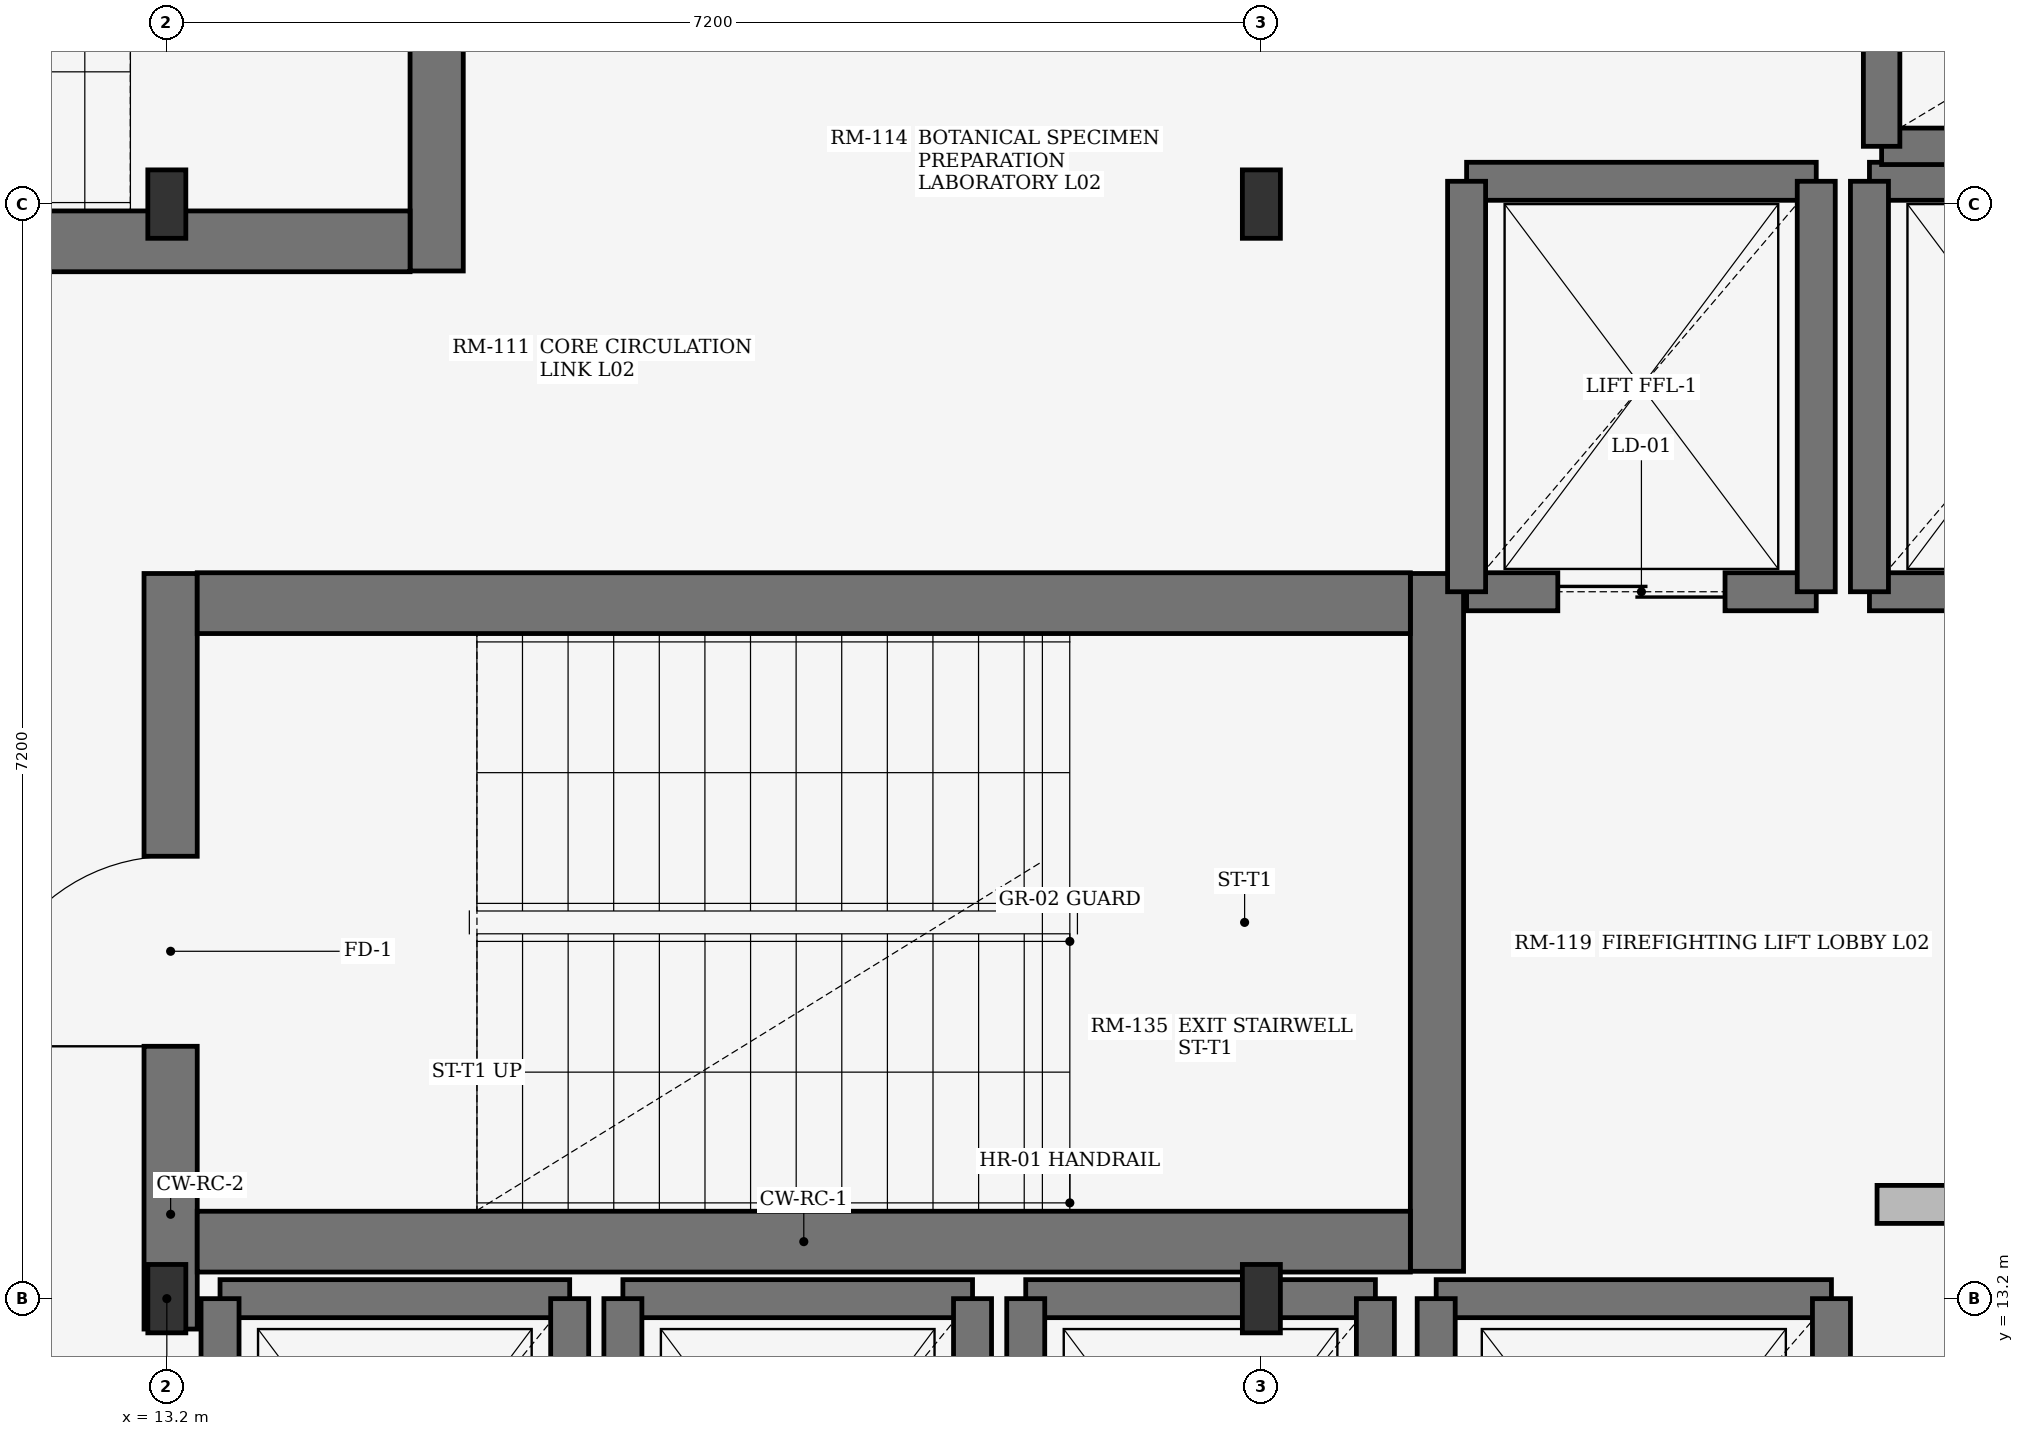
"""IFC4 building model, lengths in metres.
Left out: names, types, materials, properties, quantities, classifications, styles, units other than length and angle.
Written with IfcOpenShell. Run it as: python <this file> out.ifc"""

import sys

from ifc_helpers import new_model, si_unit, direction, frame, frame_2d, origin, origin_2d, place, context, subcontext, project, spatial, rectangle, i_section, extrude, element, fill, save


model = new_model("IFC4")
c1 = context("Model", 3, precision=1e-05, world=origin(), true_north=direction((0.0, 1.0)))
c2 = subcontext(c1, "Body", "Model", "MODEL_VIEW")
j1 = project(units=[si_unit("LENGTHUNIT", "METRE"), si_unit("PLANEANGLEUNIT", "RADIAN")], contexts=[c1])
p1 = place(None, origin())
s1 = spatial("IfcSite", under=j1, at=p1, CompositionType="ELEMENT")
p2 = place(p1, origin())
s2 = spatial("IfcBuilding", under=s1, at=p2, CompositionType="ELEMENT")
p3 = place(p2, frame((0.0, 0.0, 9.0)))
s3 = spatial("IfcBuildingStorey", under=s2, at=p3, CompositionType="ELEMENT", Elevation=9.0)
for number, where, z_axis, x_axis in (
    (1, (13.2, 13.2, 0.0), (0.0, 0.0, 1.0), (1.0, 0.0, 0.0)),
    (2, (13.2, 20.4, 0.0), (0.0, 0.0, 1.0), (1.0, 0.0, 0.0)),
    (3, (20.4, 13.2, 0.0), (0.0, 0.0, 1.0), (1.0, 0.0, 0.0)),
    (4, (20.4, 20.4, 0.0), (0.0, 0.0, 1.0), (1.0, 0.0, 0.0)),
):
    element("IfcColumn", number, at=place(p3, frame(where, z_axis=z_axis, x_axis=x_axis)), inside=s3, PredefinedType="COLUMN", context=c2, shape_type="SweptSolid", body=[
        extrude(i_section(OverallWidth=0.25, OverallDepth=0.45, WebThickness=0.011, FlangeThickness=0.014, at=origin_2d()), origin(), (0.0, 0.0, 1.0), 3.96),
    ])
p4 = place(p3, frame((13.225, 13.0, 0.0), z_axis=(0.0, 0.0, 1.0), x_axis=(0.0, 1.0, 0.0)))
e5 = element("IfcWall", 5, at=p4, inside=s3, PredefinedType="SHEAR", context=c2, shape_type="SweptSolid", body=[
    extrude(rectangle(XDim=4.97, YDim=0.35, at=frame_2d((2.485, 0.0))), origin(), (0.0, 0.0, 1.0), 3.96),
])
p5 = place(p4, frame((1.86, 0.0, 0.0)))
e6 = element("IfcOpeningElement", 6, at=p5, cuts=e5, PredefinedType="OPENING", context=c2, shape_type="SweptSolid", body=[
    extrude(rectangle(XDim=1.25, YDim=2.2, at=frame_2d((0.625, 1.1))), frame((0.0, 0.185, 0.0), z_axis=(0.0, -1.0, 0.0), x_axis=(1.0, 0.0, 0.0)), (0.0, 0.0, 1.0), 0.37),
])
p6 = place(p3, frame((21.555, 13.38, 0.0), z_axis=(0.0, 0.0, 1.0), x_axis=(0.0, 1.0, 0.0)))
e7 = element("IfcWall", 7, at=p6, inside=s3, PredefinedType="SHEAR", context=c2, shape_type="SweptSolid", body=[
    extrude(rectangle(XDim=4.59, YDim=0.35, at=frame_2d((2.295, 0.0))), origin(), (0.0, 0.0, 1.0), 3.96),
])
for number, where, z_axis, x_axis in (
    (8, (13.4, 13.575, 0.0), (0.0, 0.0, 1.0), (1.0, 0.0, 0.0)),
    (9, (13.4, 17.775, 0.0), (0.0, 0.0, 1.0), (1.0, 0.0, 0.0)),
):
    element("IfcWall", number, at=place(p3, frame(where, z_axis=z_axis, x_axis=x_axis)), inside=s3, PredefinedType="SHEAR", context=c2, shape_type="SweptSolid", body=[
        extrude(rectangle(XDim=7.98, YDim=0.4, at=frame_2d((3.99, 0.0))), origin(), (0.0, 0.0, 1.0), 3.96),
    ])
p7 = place(p3, frame((14.975, 24.55, 0.0), z_axis=(0.0, 0.0, 1.0), x_axis=(0.0, -1.0, 0.0)))
e10 = element("IfcWall", 10, at=p7, inside=s3, PredefinedType="SHEAR", context=c2, shape_type="SweptSolid", body=[
    extrude(rectangle(XDim=4.59, YDim=0.35, at=frame_2d((2.295, 0.0))), origin(), (0.0, 0.0, 1.0), 3.96),
])
p8 = place(p7, frame((1.72, 0.0, 0.0)))
e11 = element("IfcOpeningElement", 11, at=p8, cuts=e10, PredefinedType="OPENING", context=c2, shape_type="SweptSolid", body=[
    extrude(rectangle(XDim=1.15, YDim=2.2, at=frame_2d((0.575, 1.1))), frame((0.0, 0.185, 0.0), z_axis=(0.0, -1.0, 0.0), x_axis=(1.0, 0.0, 0.0)), (0.0, 0.0, 1.0), 0.37),
])
p9 = place(p3, frame((14.8, 20.155, 0.0), z_axis=(0.0, 0.0, 1.0), x_axis=(-1.0, 0.0, 0.0)))
e12 = element("IfcWall", 12, at=p9, inside=s3, PredefinedType="SHEAR", context=c2, shape_type="SweptSolid", body=[
    extrude(rectangle(XDim=7.98, YDim=0.4, at=frame_2d((3.99, 0.0))), origin(), (0.0, 0.0, 1.0), 3.96),
])
p10 = place(p3, frame((21.75, 17.85, 0.0), z_axis=(0.0, 0.0, 1.0), x_axis=(1.0, 0.0, 0.0)))
e13 = element("IfcWall", 13, at=p10, inside=s3, PredefinedType="SHEAR", context=c2, shape_type="SweptSolid", body=[
    extrude(rectangle(XDim=2.3, YDim=0.25, at=frame_2d((1.15, 0.0))), origin(), (0.0, 0.0, 1.0), 3.96),
])
p11 = place(p10, frame((0.6, 0.0, 0.0)))
e14 = element("IfcOpeningElement", 14, at=p11, cuts=e13, PredefinedType="OPENING", context=c2, shape_type="SweptSolid", body=[
    extrude(rectangle(XDim=1.1, YDim=2.2, at=frame_2d((0.55, 1.1))), frame((0.0, 0.135, 0.0), z_axis=(0.0, -1.0, 0.0), x_axis=(1.0, 0.0, 0.0)), (0.0, 0.0, 1.0), 0.27),
])
p12 = place(p3, frame((21.75, 20.55, 0.0), z_axis=(0.0, 0.0, 1.0), x_axis=(1.0, 0.0, 0.0)))
e15 = element("IfcWall", 15, at=p12, inside=s3, PredefinedType="SHEAR", context=c2, shape_type="SweptSolid", body=[
    extrude(rectangle(XDim=2.3, YDim=0.25, at=frame_2d((1.15, 0.0))), origin(), (0.0, 0.0, 1.0), 3.96),
])
for number, where, z_axis, x_axis in (
    (16, (21.75, 17.85, 0.0), (0.0, 0.0, 1.0), (0.0, 1.0, 0.0)),
    (17, (24.05, 17.85, 0.0), (0.0, 0.0, 1.0), (0.0, 1.0, 0.0)),
):
    element("IfcWall", number, at=place(p3, frame(where, z_axis=z_axis, x_axis=x_axis)), inside=s3, PredefinedType="SHEAR", context=c2, shape_type="SweptSolid", body=[
        extrude(rectangle(XDim=2.7, YDim=0.25, at=frame_2d((1.35, 0.0))), origin(), (0.0, 0.0, 1.0), 3.96),
    ])
p13 = place(p3, frame((24.4, 17.85, 0.0), z_axis=(0.0, 0.0, 1.0), x_axis=(1.0, 0.0, 0.0)))
e18 = element("IfcWall", 18, at=p13, inside=s3, PredefinedType="SHEAR", context=c2, shape_type="SweptSolid", body=[
    extrude(rectangle(XDim=2.3, YDim=0.25, at=frame_2d((1.15, 0.0))), origin(), (0.0, 0.0, 1.0), 3.96),
])
p14 = place(p13, frame((0.6, 0.0, 0.0)))
e19 = element("IfcOpeningElement", 19, at=p14, cuts=e18, PredefinedType="OPENING", context=c2, shape_type="SweptSolid", body=[
    extrude(rectangle(XDim=1.1, YDim=2.2, at=frame_2d((0.55, 1.1))), frame((0.0, 0.135, 0.0), z_axis=(0.0, -1.0, 0.0), x_axis=(1.0, 0.0, 0.0)), (0.0, 0.0, 1.0), 0.27),
])
p15 = place(p3, frame((24.4, 20.55, 0.0), z_axis=(0.0, 0.0, 1.0), x_axis=(1.0, 0.0, 0.0)))
e20 = element("IfcWall", 20, at=p15, inside=s3, PredefinedType="SHEAR", context=c2, shape_type="SweptSolid", body=[
    extrude(rectangle(XDim=2.3, YDim=0.25, at=frame_2d((1.15, 0.0))), origin(), (0.0, 0.0, 1.0), 3.96),
])
p16 = place(p3, frame((24.4, 17.85, 0.0), z_axis=(0.0, 0.0, 1.0), x_axis=(0.0, 1.0, 0.0)))
e21 = element("IfcWall", 21, at=p16, inside=s3, PredefinedType="SHEAR", context=c2, shape_type="SweptSolid", body=[
    extrude(rectangle(XDim=2.7, YDim=0.25, at=frame_2d((1.35, 0.0))), origin(), (0.0, 0.0, 1.0), 3.96),
])
p17 = place(p3, frame((13.55, 13.2, 0.0), z_axis=(0.0, 0.0, 1.0), x_axis=(1.0, 0.0, 0.0)))
e22 = element("IfcWall", 22, at=p17, inside=s3, PredefinedType="SHEAR", context=c2, shape_type="SweptSolid", body=[
    extrude(rectangle(XDim=2.3, YDim=0.25, at=frame_2d((1.15, 0.0))), origin(), (0.0, 0.0, 1.0), 3.96),
])
for number, where, z_axis, x_axis in (
    (23, (13.55, 10.4, 0.0), (0.0, 0.0, 1.0), (0.0, 1.0, 0.0)),
    (24, (15.85, 10.4, 0.0), (0.0, 0.0, 1.0), (0.0, 1.0, 0.0)),
):
    element("IfcWall", number, at=place(p3, frame(where, z_axis=z_axis, x_axis=x_axis)), inside=s3, PredefinedType="SHEAR", context=c2, shape_type="SweptSolid", body=[
        extrude(rectangle(XDim=2.8, YDim=0.25, at=frame_2d((1.4, 0.0))), origin(), (0.0, 0.0, 1.0), 3.96),
    ])
p18 = place(p3, frame((16.2, 13.2, 0.0), z_axis=(0.0, 0.0, 1.0), x_axis=(1.0, 0.0, 0.0)))
e25 = element("IfcWall", 25, at=p18, inside=s3, PredefinedType="SHEAR", context=c2, shape_type="SweptSolid", body=[
    extrude(rectangle(XDim=2.3, YDim=0.25, at=frame_2d((1.15, 0.0))), origin(), (0.0, 0.0, 1.0), 3.96),
])
for number, where, z_axis, x_axis in (
    (26, (16.2, 10.4, 0.0), (0.0, 0.0, 1.0), (0.0, 1.0, 0.0)),
    (27, (18.5, 10.4, 0.0), (0.0, 0.0, 1.0), (0.0, 1.0, 0.0)),
):
    element("IfcWall", number, at=place(p3, frame(where, z_axis=z_axis, x_axis=x_axis)), inside=s3, PredefinedType="SHEAR", context=c2, shape_type="SweptSolid", body=[
        extrude(rectangle(XDim=2.8, YDim=0.25, at=frame_2d((1.4, 0.0))), origin(), (0.0, 0.0, 1.0), 3.96),
    ])
p19 = place(p3, frame((18.85, 13.2, 0.0), z_axis=(0.0, 0.0, 1.0), x_axis=(1.0, 0.0, 0.0)))
e28 = element("IfcWall", 28, at=p19, inside=s3, PredefinedType="SHEAR", context=c2, shape_type="SweptSolid", body=[
    extrude(rectangle(XDim=2.3, YDim=0.25, at=frame_2d((1.15, 0.0))), origin(), (0.0, 0.0, 1.0), 3.96),
])
for number, where, z_axis, x_axis in (
    (29, (18.85, 10.4, 0.0), (0.0, 0.0, 1.0), (0.0, 1.0, 0.0)),
    (30, (21.15, 10.4, 0.0), (0.0, 0.0, 1.0), (0.0, 1.0, 0.0)),
):
    element("IfcWall", number, at=place(p3, frame(where, z_axis=z_axis, x_axis=x_axis)), inside=s3, PredefinedType="SHEAR", context=c2, shape_type="SweptSolid", body=[
        extrude(rectangle(XDim=2.8, YDim=0.25, at=frame_2d((1.4, 0.0))), origin(), (0.0, 0.0, 1.0), 3.96),
    ])
p20 = place(p3, frame((21.55, 13.2, 0.0), z_axis=(0.0, 0.0, 1.0), x_axis=(1.0, 0.0, 0.0)))
e31 = element("IfcWall", 31, at=p20, inside=s3, PredefinedType="SHEAR", context=c2, shape_type="SweptSolid", body=[
    extrude(rectangle(XDim=2.6, YDim=0.25, at=frame_2d((1.3, 0.0))), origin(), (0.0, 0.0, 1.0), 3.96),
])
for number, where, z_axis, x_axis in (
    (32, (21.55, 10.2, 0.0), (0.0, 0.0, 1.0), (0.0, 1.0, 0.0)),
    (33, (24.15, 10.2, 0.0), (0.0, 0.0, 1.0), (0.0, 1.0, 0.0)),
):
    element("IfcWall", number, at=place(p3, frame(where, z_axis=z_axis, x_axis=x_axis)), inside=s3, PredefinedType="SHEAR", context=c2, shape_type="SweptSolid", body=[
        extrude(rectangle(XDim=3.0, YDim=0.25, at=frame_2d((1.5, 0.0))), origin(), (0.0, 0.0, 1.0), 3.96),
    ])
p21 = place(p3, frame((24.48, 20.78, 0.0), z_axis=(0.0, 0.0, 1.0), x_axis=(1.0, 0.0, 0.0)))
e34 = element("IfcWall", 34, at=p21, inside=s3, PredefinedType="SHEAR", context=c2, shape_type="SweptSolid", body=[
    extrude(rectangle(XDim=2.24, YDim=0.24, at=frame_2d((1.12, 0.0))), origin(), (0.0, 0.0, 1.0), 3.96),
])
p22 = place(p3, frame((24.48, 20.78, 0.0), z_axis=(0.0, 0.0, 1.0), x_axis=(0.0, 1.0, 0.0)))
e35 = element("IfcWall", 35, at=p22, inside=s3, PredefinedType="SHEAR", context=c2, shape_type="SweptSolid", body=[
    extrude(rectangle(XDim=2.94, YDim=0.24, at=frame_2d((1.47, 0.0))), origin(), (0.0, 0.0, 1.0), 3.96),
])
p23 = place(p3, frame((24.45, 13.82, 0.0), z_axis=(0.0, 0.0, 1.0), x_axis=(1.0, 0.0, 0.0)))
e36 = element("IfcWall", 36, at=p23, inside=s3, PredefinedType="SOLIDWALL", context=c2, shape_type="SweptSolid", body=[
    extrude(rectangle(XDim=2.0, YDim=0.25, at=frame_2d((1.0, 0.0))), origin(), (0.0, 0.0, 1.0), 3.94),
])
p24 = place(p5, origin())
e37 = element("IfcDoor", 37, at=p24, inside=s3, OperationType="SINGLE_SWING_LEFT", PredefinedType="DOOR", context=c2, shape_type="SweptSolid", body=[
    extrude(rectangle(XDim=1.25, YDim=2.2, at=frame_2d((0.625, 1.1))), frame((0.0, 0.025, 0.0), z_axis=(0.0, -1.0, 0.0), x_axis=(1.0, 0.0, 0.0)), (0.0, 0.0, 1.0), 0.05),
])
fill(e6, e37)
p25 = place(p11, origin())
e38 = element("IfcDoor", 38, at=p25, inside=s3, OperationType="DOUBLE_DOOR_SLIDING", PredefinedType="DOOR", context=c2, shape_type="SweptSolid", body=[
    extrude(rectangle(XDim=1.1, YDim=2.2, at=frame_2d((0.55, 1.1))), frame((0.0, 0.025, 0.0), z_axis=(0.0, -1.0, 0.0), x_axis=(1.0, 0.0, 0.0)), (0.0, 0.0, 1.0), 0.05),
])
fill(e14, e38)
save(model, sys.argv[1])
